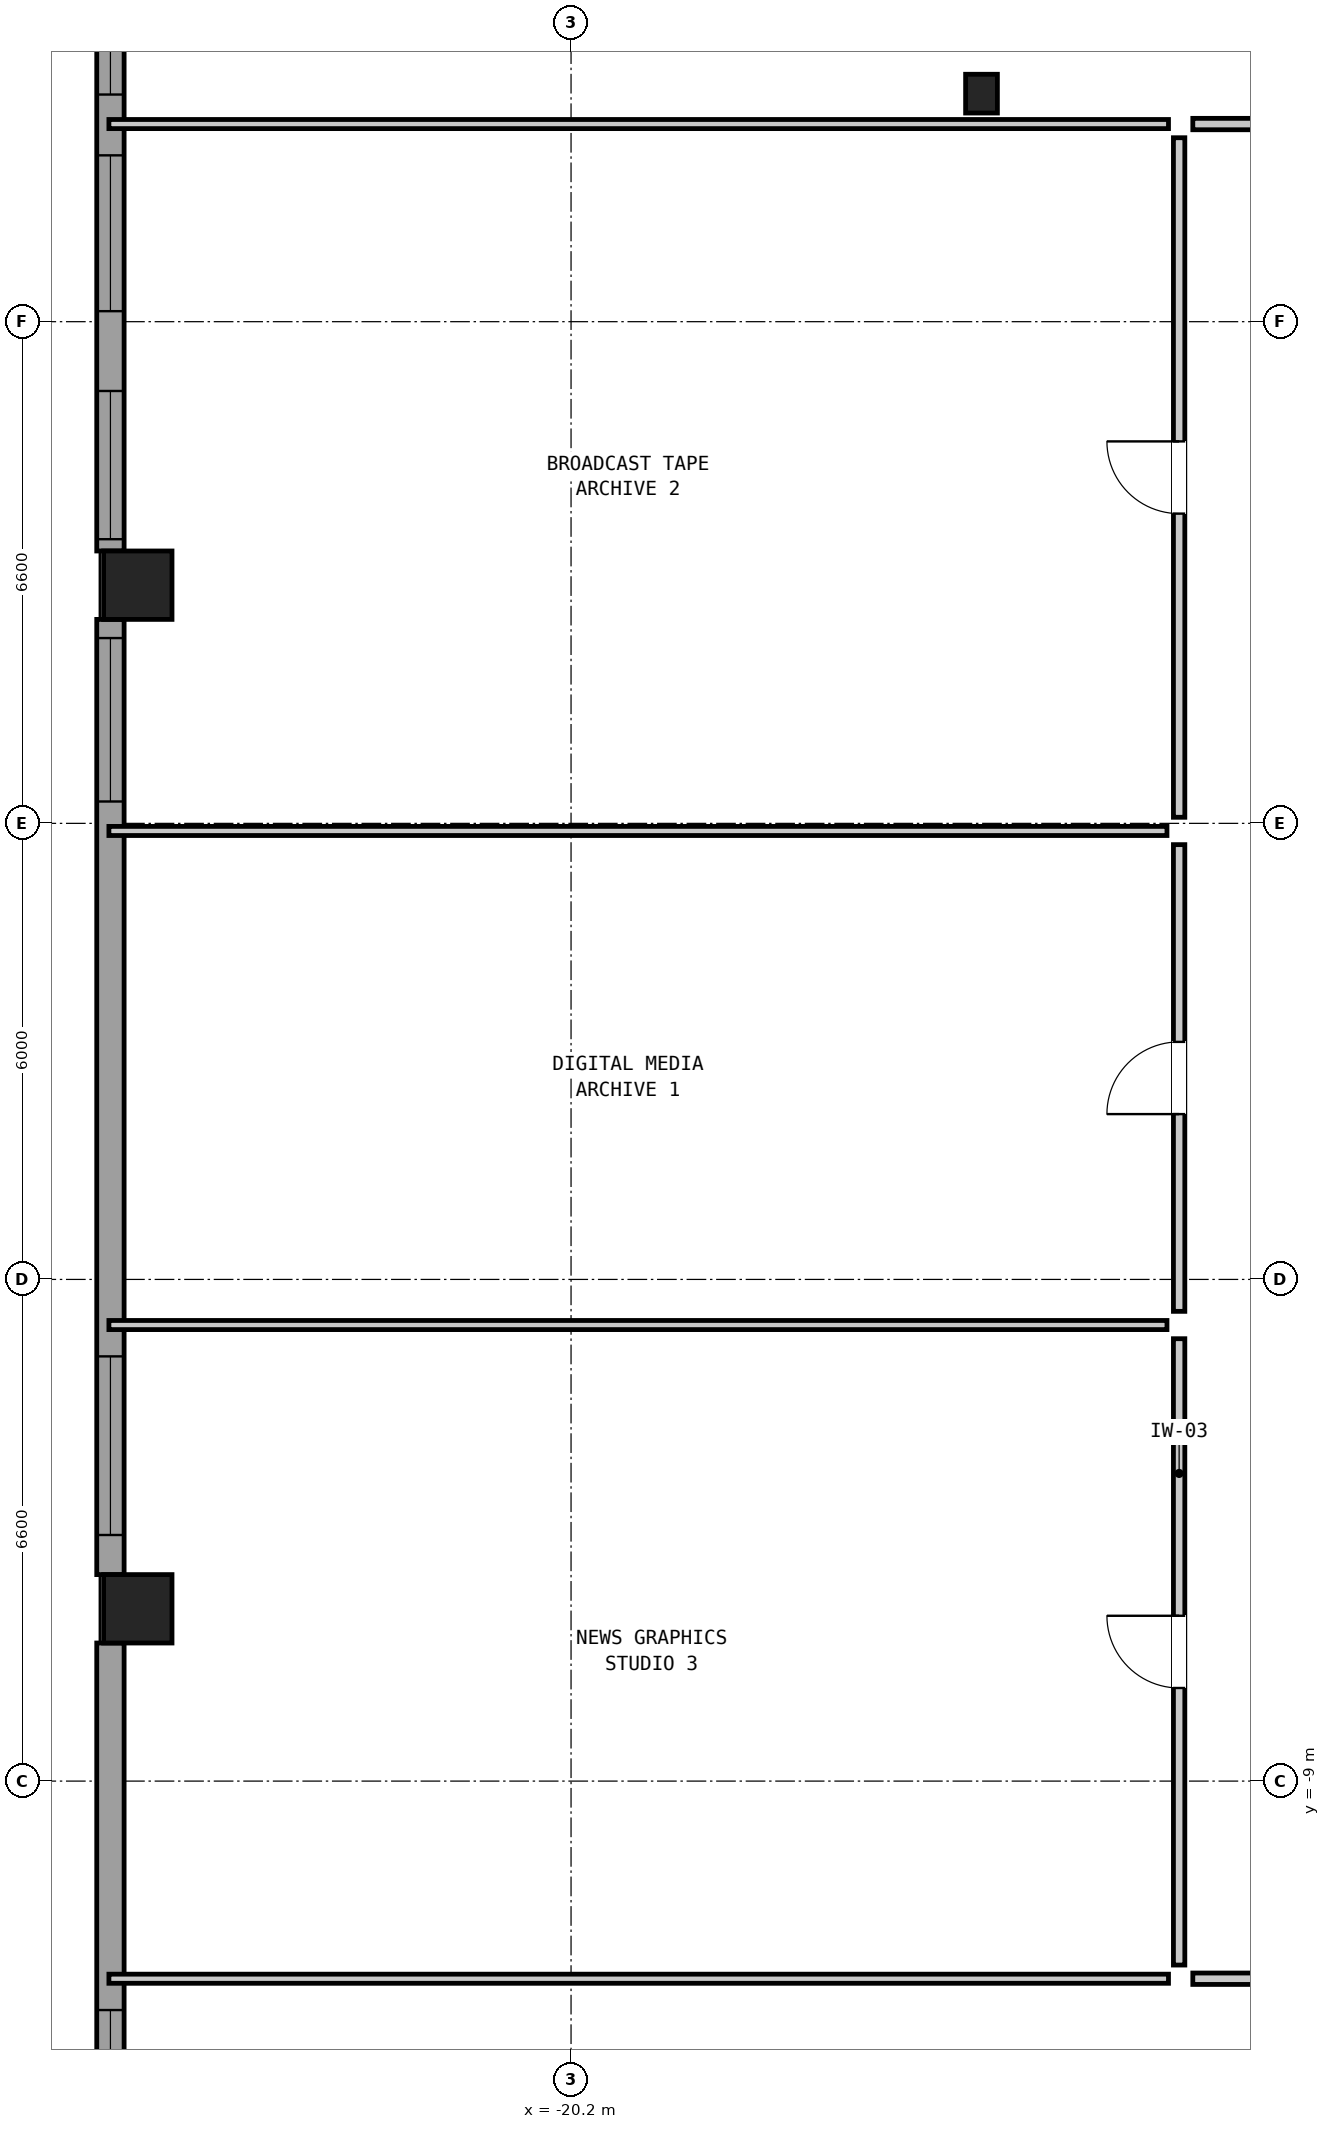
"""IFC4 building model, lengths in metres.
Left out: names, types, materials, properties, quantities, classifications, styles, units other than length and angle.
Written with IfcOpenShell. Run it as: python <this file> out.ifc"""

import sys

from ifc_helpers import new_model, si_unit, direction, frame, frame_2d, origin, origin_2d, place, context, subcontext, project, spatial, rectangle, hollow_rectangle, i_section, extrude, element, fill, save


model = new_model("IFC4")
c1 = context("Model", 3, precision=1e-05, world=origin(), true_north=direction((0.0, 1.0)))
c2 = subcontext(c1, "Body", "Model", "MODEL_VIEW")
j1 = project(units=[si_unit("LENGTHUNIT", "METRE"), si_unit("PLANEANGLEUNIT", "RADIAN")], contexts=[c1])
p1 = place(None, origin())
s1 = spatial("IfcSite", under=j1, at=p1, CompositionType="ELEMENT")
p2 = place(p1, origin())
s2 = spatial("IfcBuilding", under=s1, at=p2, CompositionType="ELEMENT")
p3 = place(p2, frame((0.0, 0.0, 44.4)))
s3 = spatial("IfcBuildingStorey", under=s2, at=p3, CompositionType="ELEMENT", Elevation=44.4)
for number, where, z_axis, x_axis in (
    (1, (-25.9, 6.733, 0.0), (0.0, 0.0, 1.0), (0.0, 1.0, 0.0)),
    (2, (-25.9, -6.733, 0.0), (0.0, 0.0, 1.0), (0.0, 1.0, 0.0)),
):
    element("IfcColumn", number, at=place(p3, frame(where, z_axis=z_axis, x_axis=x_axis)), inside=s3, PredefinedType="COLUMN", context=c2, shape_type="SweptSolid", body=[
        extrude(hollow_rectangle(XDim=0.9, YDim=0.9, WallThickness=0.055, at=origin_2d()), origin(), (0.0, 0.0, 1.0), 3.05),
    ])
p4 = place(p3, frame((-14.8, 13.2, 0.0), z_axis=(0.0, 0.0, 1.0), x_axis=(1.0, 0.0, 0.0)))
e3 = element("IfcColumn", 3, at=p4, inside=s3, PredefinedType="COLUMN", context=c2, shape_type="SweptSolid", body=[
    extrude(i_section(OverallWidth=0.418, OverallDepth=0.51, WebThickness=0.042, FlangeThickness=0.068, at=origin_2d()), origin(), (0.0, 0.0, 1.0), 3.05),
])
p5 = place(p3, frame((-26.26, -19.762, 0.0), z_axis=(0.0, 0.0, 1.0), x_axis=(0.0, 1.0, 0.0)))
e4 = element("IfcWall", 4, at=p5, inside=s3, PredefinedType="SOLIDWALL", context=c2, shape_type="SweptSolid", body=[
    extrude(rectangle(XDim=12.579, YDim=0.36, at=frame_2d((6.289, 0.0))), origin(), (0.0, 0.0, 1.0), 2.067),
])
p6 = place(p5, frame((2.15, 0.0, 1.2)))
e5 = element("IfcOpeningElement", 5, at=p6, cuts=e4, PredefinedType="OPENING", context=c2, shape_type="SweptSolid", body=[
    extrude(rectangle(XDim=1.95, YDim=0.7, at=frame_2d((0.975, 0.35))), frame((0.0, 0.192, 0.0), z_axis=(0.0, -1.0, 0.0), x_axis=(1.0, 0.0, 0.0)), (0.0, 0.0, 1.0), 0.384),
])
p7 = place(p5, frame((5.5, 0.0, 0.2)))
e6 = element("IfcOpeningElement", 6, at=p7, cuts=e4, PredefinedType="OPENING", context=c2, shape_type="SweptSolid", body=[
    extrude(rectangle(XDim=2.25, YDim=1.2, at=frame_2d((1.125, 0.6))), frame((0.0, 0.192, 0.0), z_axis=(0.0, -1.0, 0.0), x_axis=(1.0, 0.0, 0.0)), (0.0, 0.0, 1.0), 0.384),
])
p8 = place(p3, frame((-26.26, -6.283, 0.0), z_axis=(0.0, 0.0, 1.0), x_axis=(0.0, 1.0, 0.0)))
e7 = element("IfcWall", 7, at=p8, inside=s3, PredefinedType="SOLIDWALL", context=c2, shape_type="SweptSolid", body=[
    extrude(rectangle(XDim=12.566, YDim=0.36, at=frame_2d((6.283, 0.0))), origin(), (0.0, 0.0, 1.0), 2.067),
])
p9 = place(p8, frame((0.521, 0.0, 0.2)))
e8 = element("IfcOpeningElement", 8, at=p9, cuts=e7, PredefinedType="OPENING", context=c2, shape_type="SweptSolid", body=[
    extrude(rectangle(XDim=2.35, YDim=1.3, at=frame_2d((1.175, 0.65))), frame((0.0, 0.192, 0.0), z_axis=(0.0, -1.0, 0.0), x_axis=(1.0, 0.0, 0.0)), (0.0, 0.0, 1.0), 0.384),
])
p10 = place(p8, frame((10.171, 0.0, 0.2)))
e9 = element("IfcOpeningElement", 9, at=p10, cuts=e7, PredefinedType="OPENING", context=c2, shape_type="SweptSolid", body=[
    extrude(rectangle(XDim=2.15, YDim=1.15, at=frame_2d((1.075, 0.575))), frame((0.0, 0.192, 0.0), z_axis=(0.0, -1.0, 0.0), x_axis=(1.0, 0.0, 0.0)), (0.0, 0.0, 1.0), 0.384),
])
p11 = place(p3, frame((-26.26, 7.183, 0.0), z_axis=(0.0, 0.0, 1.0), x_axis=(0.0, 1.0, 0.0)))
e10 = element("IfcWall", 10, at=p11, inside=s3, PredefinedType="SOLIDWALL", context=c2, shape_type="SweptSolid", body=[
    extrude(rectangle(XDim=12.579, YDim=0.36, at=frame_2d((6.289, 0.0))), origin(), (0.0, 0.0, 1.0), 2.067),
])
p12 = place(p11, frame((0.155, 0.0, 1.2)))
e11 = element("IfcOpeningElement", 11, at=p12, cuts=e10, PredefinedType="OPENING", context=c2, shape_type="SweptSolid", body=[
    extrude(rectangle(XDim=1.95, YDim=0.7, at=frame_2d((0.975, 0.35))), frame((0.0, 0.192, 0.0), z_axis=(0.0, -1.0, 0.0), x_axis=(1.0, 0.0, 0.0)), (0.0, 0.0, 1.0), 0.384),
])
p13 = place(p11, frame((3.155, 0.0, 0.2)))
e12 = element("IfcOpeningElement", 12, at=p13, cuts=e10, PredefinedType="OPENING", context=c2, shape_type="SweptSolid", body=[
    extrude(rectangle(XDim=2.05, YDim=1.0, at=frame_2d((1.025, 0.5))), frame((0.0, 0.192, 0.0), z_axis=(0.0, -1.0, 0.0), x_axis=(1.0, 0.0, 0.0)), (0.0, 0.0, 1.0), 0.384),
])
p14 = place(p11, frame((6.005, 0.0, 0.2)))
e13 = element("IfcOpeningElement", 13, at=p14, cuts=e10, PredefinedType="OPENING", context=c2, shape_type="SweptSolid", body=[
    extrude(rectangle(XDim=1.7, YDim=0.85, at=frame_2d((0.85, 0.425))), frame((0.0, 0.192, 0.0), z_axis=(0.0, -1.0, 0.0), x_axis=(1.0, 0.0, 0.0)), (0.0, 0.0, 1.0), 0.384),
])
p15 = place(p3, frame((-26.28, 12.8, 0.0), z_axis=(0.0, 0.0, 1.0), x_axis=(1.0, 0.0, 0.0)))
e14 = element("IfcWall", 14, at=p15, inside=s3, PredefinedType="PARTITIONING", context=c2, shape_type="SweptSolid", body=[
    extrude(rectangle(XDim=13.94, YDim=0.12, at=frame_2d((6.97, 0.0))), origin(), (0.0, 0.0, 1.0), 2.83),
])
p16 = place(p3, frame((-26.28, -11.6, 0.0), z_axis=(0.0, 0.0, 1.0), x_axis=(1.0, 0.0, 0.0)))
e15 = element("IfcWall", 15, at=p16, inside=s3, PredefinedType="PARTITIONING", context=c2, shape_type="SweptSolid", body=[
    extrude(rectangle(XDim=13.94, YDim=0.12, at=frame_2d((6.97, 0.0))), origin(), (0.0, 0.0, 1.0), 2.274),
])
for number, where, z_axis, x_axis in (
    (16, (-26.28, -3.0, 0.0), (0.0, 0.0, 1.0), (1.0, 0.0, 0.0)),
    (17, (-26.28, 3.5, 0.0), (0.0, 0.0, 1.0), (1.0, 0.0, 0.0)),
):
    element("IfcWall", number, at=place(p3, frame(where, z_axis=z_axis, x_axis=x_axis)), inside=s3, PredefinedType="PARTITIONING", context=c2, shape_type="SweptSolid", body=[
        extrude(rectangle(XDim=13.92, YDim=0.12, at=frame_2d((6.96, 0.0))), origin(), (0.0, 0.0, 1.0), 1.799),
    ])
p17 = place(p3, frame((-12.02, 12.8, 0.0), z_axis=(0.0, 0.0, 1.0), x_axis=(1.0, 0.0, 0.0)))
e18 = element("IfcWall", 18, at=p17, inside=s3, PredefinedType="PARTITIONING", context=c2, shape_type="SweptSolid", body=[
    extrude(rectangle(XDim=5.34, YDim=0.15, at=frame_2d((2.67, 0.0))), origin(), (0.0, 0.0, 1.0), 2.83),
])
p18 = place(p17, frame((2.995, 0.0, 0.0)))
e19 = element("IfcOpeningElement", 19, at=p18, cuts=e18, PredefinedType="OPENING", context=c2, shape_type="SweptSolid", body=[
    extrude(rectangle(XDim=0.95, YDim=2.1, at=frame_2d((0.475, 1.05))), frame((0.0, 0.087, 0.0), z_axis=(0.0, -1.0, 0.0), x_axis=(1.0, 0.0, 0.0)), (0.0, 0.0, 1.0), 0.174),
])
p19 = place(p3, frame((-12.02, -11.6, 0.0), z_axis=(0.0, 0.0, 1.0), x_axis=(1.0, 0.0, 0.0)))
e20 = element("IfcWall", 20, at=p19, inside=s3, PredefinedType="PARTITIONING", context=c2, shape_type="SweptSolid", body=[
    extrude(rectangle(XDim=5.84, YDim=0.15, at=frame_2d((2.92, 0.0))), origin(), (0.0, 0.0, 1.0), 2.274),
])
p20 = place(p19, frame((3.045, 0.0, 0.0)))
e21 = element("IfcOpeningElement", 21, at=p20, cuts=e20, PredefinedType="OPENING", context=c2, shape_type="SweptSolid", body=[
    extrude(rectangle(XDim=0.95, YDim=2.1, at=frame_2d((0.475, 1.05))), frame((0.0, 0.087, 0.0), z_axis=(0.0, -1.0, 0.0), x_axis=(1.0, 0.0, 0.0)), (0.0, 0.0, 1.0), 0.174),
])
p21 = place(p3, frame((-12.2, -11.42, 0.0), z_axis=(0.0, 0.0, 1.0), x_axis=(0.0, 1.0, 0.0)))
e22 = element("IfcWall", 22, at=p21, inside=s3, PredefinedType="PARTITIONING", context=c2, shape_type="SweptSolid", body=[
    extrude(rectangle(XDim=8.24, YDim=0.15, at=frame_2d((4.12, 0.0))), origin(), (0.0, 0.0, 1.0), 2.83),
])
p22 = place(p21, frame((3.645, 0.0, 0.0)))
e23 = element("IfcOpeningElement", 23, at=p22, cuts=e22, PredefinedType="OPENING", context=c2, shape_type="SweptSolid", body=[
    extrude(rectangle(XDim=0.95, YDim=2.1, at=frame_2d((0.475, 1.05))), frame((0.0, 0.087, 0.0), z_axis=(0.0, -1.0, 0.0), x_axis=(1.0, 0.0, 0.0)), (0.0, 0.0, 1.0), 0.174),
])
p23 = place(p3, frame((-12.2, -2.82, 0.0), z_axis=(0.0, 0.0, 1.0), x_axis=(0.0, 1.0, 0.0)))
e24 = element("IfcWall", 24, at=p23, inside=s3, PredefinedType="PARTITIONING", context=c2, shape_type="SweptSolid", body=[
    extrude(rectangle(XDim=6.14, YDim=0.15, at=frame_2d((3.07, 0.0))), origin(), (0.0, 0.0, 1.0), 2.83),
])
p24 = place(p23, frame((2.595, 0.0, 0.0)))
e25 = element("IfcOpeningElement", 25, at=p24, cuts=e24, PredefinedType="OPENING", context=c2, shape_type="SweptSolid", body=[
    extrude(rectangle(XDim=0.95, YDim=2.1, at=frame_2d((0.475, 1.05))), frame((0.0, 0.087, 0.0), z_axis=(0.0, -1.0, 0.0), x_axis=(1.0, 0.0, 0.0)), (0.0, 0.0, 1.0), 0.174),
])
p25 = place(p3, frame((-12.2, 3.68, 0.0), z_axis=(0.0, 0.0, 1.0), x_axis=(0.0, 1.0, 0.0)))
e26 = element("IfcWall", 26, at=p25, inside=s3, PredefinedType="PARTITIONING", context=c2, shape_type="SweptSolid", body=[
    extrude(rectangle(XDim=8.94, YDim=0.15, at=frame_2d((4.47, 0.0))), origin(), (0.0, 0.0, 1.0), 2.83),
])
p26 = place(p25, frame((3.995, 0.0, 0.0)))
e27 = element("IfcOpeningElement", 27, at=p26, cuts=e26, PredefinedType="OPENING", context=c2, shape_type="SweptSolid", body=[
    extrude(rectangle(XDim=0.95, YDim=2.1, at=frame_2d((0.475, 1.05))), frame((0.0, 0.087, 0.0), z_axis=(0.0, -1.0, 0.0), x_axis=(1.0, 0.0, 0.0)), (0.0, 0.0, 1.0), 0.174),
])
p27 = place(p7, origin())
e28 = element("IfcWindow", 28, at=p27, inside=s3, PartitioningType="SINGLE_PANEL", PredefinedType="WINDOW", context=c2, shape_type="SweptSolid", body=[
    extrude(rectangle(XDim=2.25, YDim=1.2, at=frame_2d((1.125, 0.6))), frame((0.0, 0.03, 0.0), z_axis=(0.0, -1.0, 0.0), x_axis=(1.0, 0.0, 0.0)), (0.0, 0.0, 1.0), 0.06),
])
fill(e6, e28)
p28 = place(p9, origin())
e29 = element("IfcWindow", 29, at=p28, inside=s3, PartitioningType="SINGLE_PANEL", PredefinedType="WINDOW", context=c2, shape_type="SweptSolid", body=[
    extrude(rectangle(XDim=2.35, YDim=1.3, at=frame_2d((1.175, 0.65))), frame((0.0, 0.03, 0.0), z_axis=(0.0, -1.0, 0.0), x_axis=(1.0, 0.0, 0.0)), (0.0, 0.0, 1.0), 0.06),
])
fill(e8, e29)
p29 = place(p10, origin())
e30 = element("IfcWindow", 30, at=p29, inside=s3, PartitioningType="SINGLE_PANEL", PredefinedType="WINDOW", context=c2, shape_type="SweptSolid", body=[
    extrude(rectangle(XDim=2.15, YDim=1.15, at=frame_2d((1.075, 0.575))), frame((0.0, 0.03, 0.0), z_axis=(0.0, -1.0, 0.0), x_axis=(1.0, 0.0, 0.0)), (0.0, 0.0, 1.0), 0.06),
])
fill(e9, e30)
p30 = place(p12, origin())
e31 = element("IfcWindow", 31, at=p30, inside=s3, PartitioningType="SINGLE_PANEL", PredefinedType="WINDOW", context=c2, shape_type="SweptSolid", body=[
    extrude(rectangle(XDim=1.95, YDim=0.7, at=frame_2d((0.975, 0.35))), frame((0.0, 0.03, 0.0), z_axis=(0.0, -1.0, 0.0), x_axis=(1.0, 0.0, 0.0)), (0.0, 0.0, 1.0), 0.06),
])
fill(e11, e31)
p31 = place(p13, origin())
e32 = element("IfcWindow", 32, at=p31, inside=s3, PartitioningType="SINGLE_PANEL", PredefinedType="WINDOW", context=c2, shape_type="SweptSolid", body=[
    extrude(rectangle(XDim=2.05, YDim=1.0, at=frame_2d((1.025, 0.5))), frame((0.0, 0.03, 0.0), z_axis=(0.0, -1.0, 0.0), x_axis=(1.0, 0.0, 0.0)), (0.0, 0.0, 1.0), 0.06),
])
fill(e12, e32)
p32 = place(p14, origin())
e33 = element("IfcWindow", 33, at=p32, inside=s3, PartitioningType="SINGLE_PANEL", PredefinedType="WINDOW", context=c2, shape_type="SweptSolid", body=[
    extrude(rectangle(XDim=1.7, YDim=0.85, at=frame_2d((0.85, 0.425))), frame((0.0, 0.03, 0.0), z_axis=(0.0, -1.0, 0.0), x_axis=(1.0, 0.0, 0.0)), (0.0, 0.0, 1.0), 0.06),
])
fill(e13, e33)
p33 = place(p22, origin())
e34 = element("IfcDoor", 34, at=p33, inside=s3, OperationType="SINGLE_SWING_RIGHT", PredefinedType="DOOR", context=c2, shape_type="SweptSolid", body=[
    extrude(rectangle(XDim=0.95, YDim=2.1, at=frame_2d((0.475, 1.05))), frame((0.0, 0.025, 0.0), z_axis=(0.0, -1.0, 0.0), x_axis=(1.0, 0.0, 0.0)), (0.0, 0.0, 1.0), 0.05),
])
fill(e23, e34)
p34 = place(p24, origin())
e35 = element("IfcDoor", 35, at=p34, inside=s3, OperationType="SINGLE_SWING_LEFT", PredefinedType="DOOR", context=c2, shape_type="SweptSolid", body=[
    extrude(rectangle(XDim=0.95, YDim=2.1, at=frame_2d((0.475, 1.05))), frame((0.0, 0.025, 0.0), z_axis=(0.0, -1.0, 0.0), x_axis=(1.0, 0.0, 0.0)), (0.0, 0.0, 1.0), 0.05),
])
fill(e25, e35)
p35 = place(p26, origin())
e36 = element("IfcDoor", 36, at=p35, inside=s3, OperationType="SINGLE_SWING_RIGHT", PredefinedType="DOOR", context=c2, shape_type="SweptSolid", body=[
    extrude(rectangle(XDim=0.95, YDim=2.1, at=frame_2d((0.475, 1.05))), frame((0.0, 0.025, 0.0), z_axis=(0.0, -1.0, 0.0), x_axis=(1.0, 0.0, 0.0)), (0.0, 0.0, 1.0), 0.05),
])
fill(e27, e36)
save(model, sys.argv[1])
